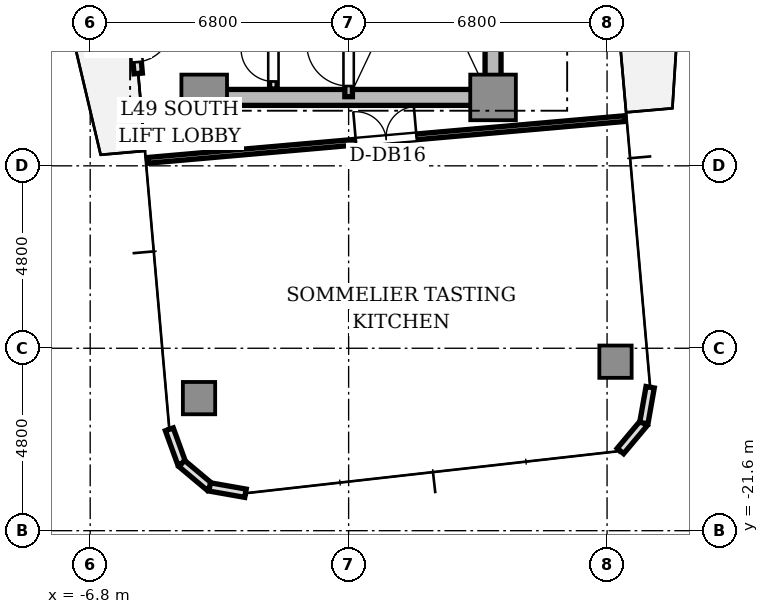
"""IFC4 building model, lengths in metres.
Left out: names, types, materials, properties, quantities, classifications, styles, units other than length and angle.
Written with IfcOpenShell. Run it as: python <this file> out.ifc"""

import sys

from ifc_helpers import new_model, si_unit, direction, frame, frame_2d, origin, origin_2d, place, context, subcontext, project, spatial, rectangle, extrude, source, transform, mapped, element, fill, save


model = new_model("IFC4")
c1 = context("Model", 3, precision=1e-05, world=origin(), true_north=direction((0.0, 1.0)))
c2 = subcontext(c1, "Body", "Model", "MODEL_VIEW")
j1 = project(units=[si_unit("LENGTHUNIT", "METRE"), si_unit("PLANEANGLEUNIT", "RADIAN")], contexts=[c1])
p1 = place(None, origin())
s1 = spatial("IfcSite", under=j1, at=p1, CompositionType="ELEMENT")
p2 = place(p1, origin())
s2 = spatial("IfcBuilding", under=s1, at=p2, CompositionType="ELEMENT")
p3 = place(p2, frame((0.0, 0.0, 178.55)))
s3 = spatial("IfcBuildingStorey", under=s2, at=p3, CompositionType="ELEMENT", Elevation=178.55)
p4 = place(p3, frame((-3.55, -10.2, 0.0), z_axis=(0.0, 0.0, 1.0), x_axis=(1.0, 0.0, 0.0)))
e1 = element("IfcWall", 1, at=p4, inside=s3, PredefinedType="SHEAR", context=c2, shape_type="SweptSolid", body=[
    extrude(rectangle(XDim=7.1, YDim=0.42, at=frame_2d((3.55, 0.0))), origin(), (0.0, 0.0, 1.0), 3.11),
])
p5 = place(p3, frame((3.8, -9.75, 0.0), z_axis=(0.0, 0.0, 1.0), x_axis=(0.0, 1.0, 0.0)))
e2 = element("IfcWall", 2, at=p5, inside=s3, PredefinedType="SHEAR", context=c2, shape_type="SweptSolid", body=[
    extrude(rectangle(XDim=6.9, YDim=0.42, at=frame_2d((3.45, 0.0))), origin(), (0.0, 0.0, 1.0), 3.11),
])
m1 = source(origin(), c2, "Body", "SweptSolid", [
    extrude(rectangle(XDim=1.2, YDim=1.2, at=origin_2d()), origin(), (0.0, 0.0, 1.0), 3.11),
])
for number, where, z_axis, x_axis in (
    (3, (-3.8, -10.2, 0.0), (0.0, 0.0, 1.0), (1.0, 0.0, 0.0)),
    (4, (3.8, -10.2, 0.0), (0.0, 0.0, 1.0), (1.0, 0.0, 0.0)),
):
    element("IfcColumn", number, at=place(p3, frame(where, z_axis=z_axis, x_axis=x_axis)), inside=s3, PredefinedType="COLUMN", context=c2, shape_type="MappedRepresentation", body=[
        mapped(m1, transform((0.0, 0.0, 0.0), scale=1.0)),
    ])
m2 = source(origin(), c2, "Body", "SweptSolid", [
    extrude(rectangle(XDim=0.85, YDim=0.85, at=origin_2d()), origin(), (0.0, 0.0, 1.0), 3.11),
])
for number, where, z_axis, x_axis in (
    (5, (-3.936, -18.112, 0.0), (0.0, 0.0, 1.0), (1.0, 0.0, 0.0)),
    (6, (7.022, -17.153, 0.0), (0.0, 0.0, 1.0), (1.0, 0.0, 0.0)),
):
    element("IfcColumn", number, at=place(p3, frame(where, z_axis=z_axis, x_axis=x_axis)), inside=s3, PredefinedType="COLUMN", context=c2, shape_type="MappedRepresentation", body=[
        mapped(m2, transform((0.0, 0.0, 0.0), scale=1.0)),
    ])
p6 = place(p3, frame((-5.772, -6.879, 0.0), z_axis=(0.0, 0.0, 1.0), x_axis=(0.087168071984, -0.996193619346, 0.0)))
e7 = element("IfcWall", 7, at=p6, inside=s3, PredefinedType="STANDARD", context=c2, shape_type="SweptSolid", body=[
    extrude(rectangle(XDim=2.7, YDim=0.22, at=frame_2d((1.35, 0.0))), origin(), (0.0, 0.0, 1.0), 3.11),
])
p7 = place(p6, frame((1.4, 0.0, 0.0)))
e8 = element("IfcOpeningElement", 8, at=p7, cuts=e7, PredefinedType="OPENING", context=c2, shape_type="SweptSolid", body=[
    extrude(rectangle(XDim=1.0, YDim=2.2, at=frame_2d((0.5, 1.1))), frame((0.0, 0.12, 0.0), z_axis=(0.0, -1.0, 0.0), x_axis=(1.0, 0.0, 0.0)), (0.0, 0.0, 1.0), 0.24),
])
p8 = place(p3, frame((-4.718, -18.933, 0.0), z_axis=(0.0, 0.0, 1.0), x_axis=(0.34188635151, -0.939741306239, 0.0)))
e9 = element("IfcWall", 9, at=p8, inside=s3, PredefinedType="STANDARD", context=c2, shape_type="SweptSolid", body=[
    extrude(rectangle(XDim=0.958, YDim=0.22, at=frame_2d((0.479, 0.0))), origin(), (0.0, 0.0, 1.0), 3.11),
])
for number, where, z_axis, x_axis in (
    (10, (-4.39, -19.833, 0.0), (0.0, 0.0, 1.0), (0.766, -0.643, 0.0)),
    (11, (-3.657, -20.449, 0.0), (0.0, 0.0, 1.0), (0.985, -0.174, 0.0)),
):
    element("IfcWall", number, at=place(p3, frame(where, z_axis=z_axis, x_axis=x_axis)), inside=s3, PredefinedType="STANDARD", context=c2, shape_type="SweptSolid", body=[
        extrude(rectangle(XDim=0.958, YDim=0.22, at=frame_2d((0.479, 0.0))), origin(), (0.0, 0.0, 1.0), 3.11),
    ])
for number, where, z_axis, x_axis in (
    (12, (7.152, -19.503, 0.0), (0.0, 0.0, 1.0), (0.643, 0.766, 0.0)),
    (13, (7.768, -18.769, 0.0), (0.0, 0.0, 1.0), (0.174, 0.985, 0.0)),
):
    element("IfcWall", number, at=place(p3, frame(where, z_axis=z_axis, x_axis=x_axis)), inside=s3, PredefinedType="STANDARD", context=c2, shape_type="SweptSolid", body=[
        extrude(rectangle(XDim=0.958, YDim=0.22, at=frame_2d((0.479, 0.0))), origin(), (0.0, 0.0, 1.0), 3.11),
    ])
p9 = place(p3, frame((0.0, -10.18, 0.0), z_axis=(0.0, 0.0, 1.0), x_axis=(0.0, 1.0, 0.0)))
e14 = element("IfcWall", 14, at=p9, inside=s3, PredefinedType="SOLIDWALL", context=c2, shape_type="SweptSolid", body=[
    extrude(rectangle(XDim=7.68, YDim=0.2, at=frame_2d((3.84, 0.0))), origin(), (0.0, 0.0, 1.0), 3.11),
])
p10 = place(p9, frame((0.28, 0.0, 0.0)))
e15 = element("IfcOpeningElement", 15, at=p10, cuts=e14, PredefinedType="OPENING", context=c2, shape_type="SweptSolid", body=[
    extrude(rectangle(XDim=1.1, YDim=2.15, at=frame_2d((0.55, 1.075))), frame((0.0, 0.11, 0.0), z_axis=(0.0, -1.0, 0.0), x_axis=(1.0, 0.0, 0.0)), (0.0, 0.0, 1.0), 0.22),
])
p11 = place(p3, frame((-1.98, -9.98, 0.0), z_axis=(0.0, 0.0, 1.0), x_axis=(0.0, 1.0, 0.0)))
e16 = element("IfcWall", 16, at=p11, inside=s3, PredefinedType="SOLIDWALL", context=c2, shape_type="SweptSolid", body=[
    extrude(rectangle(XDim=4.66, YDim=0.2, at=frame_2d((2.33, 0.0))), origin(), (0.0, 0.0, 1.0), 2.66),
])
p12 = place(p11, frame((0.2, 0.0, 0.0)))
e17 = element("IfcOpeningElement", 17, at=p12, cuts=e16, PredefinedType="OPENING", context=c2, shape_type="SweptSolid", body=[
    extrude(rectangle(XDim=0.85, YDim=2.1, at=frame_2d((0.425, 1.05))), frame((0.0, 0.11, 0.0), z_axis=(0.0, -1.0, 0.0), x_axis=(1.0, 0.0, 0.0)), (0.0, 0.0, 1.0), 0.22),
])
p13 = place(p3, frame((-5.287, -11.856, 0.0), z_axis=(0.0, 0.0, 1.0), x_axis=(0.996194790044, 0.087154691724, 0.0)))
e18 = element("IfcWall", 18, at=p13, inside=s3, PredefinedType="PARTITIONING", context=c2, shape_type="SweptSolid", body=[
    extrude(rectangle(XDim=12.6, YDim=0.15, at=frame_2d((6.3, 0.0))), origin(), (0.0, 0.0, 1.0), 2.66),
])
p14 = place(p13, frame((5.5, 0.0, 0.0)))
e19 = element("IfcOpeningElement", 19, at=p14, cuts=e18, PredefinedType="OPENING", context=c2, shape_type="SweptSolid", body=[
    extrude(rectangle(XDim=1.6, YDim=2.25, at=frame_2d((0.8, 1.125))), frame((0.0, 0.085, 0.0), z_axis=(0.0, -1.0, 0.0), x_axis=(1.0, 0.0, 0.0)), (0.0, 0.0, 1.0), 0.17),
])
m3 = source(origin(), c2, "Body", "SweptSolid", [
    extrude(rectangle(XDim=1.0, YDim=0.05, at=origin_2d()), origin(), (0.0, 0.0, 1.0), 2.2),
])
p15 = place(p7, frame((0.5, 0.0, 0.0)))
e20 = element("IfcDoor", 20, at=p15, inside=s3, OperationType="SINGLE_SWING_LEFT", PredefinedType="DOOR", context=c2, shape_type="MappedRepresentation", body=[
    mapped(m3, transform((0.0, 0.0, 0.0), scale=1.0)),
])
fill(e8, e20)
m4 = source(origin(), c2, "Body", "SweptSolid", [
    extrude(rectangle(XDim=1.1, YDim=0.05, at=origin_2d()), origin(), (0.0, 0.0, 1.0), 2.15),
])
p16 = place(p10, frame((0.55, 0.0, 0.0)))
e21 = element("IfcDoor", 21, at=p16, inside=s3, OperationType="SINGLE_SWING_RIGHT", PredefinedType="DOOR", context=c2, shape_type="MappedRepresentation", body=[
    mapped(m4, transform((0.0, 0.0, 0.0), scale=1.0)),
])
fill(e15, e21)
m5 = source(origin(), c2, "Body", "SweptSolid", [
    extrude(rectangle(XDim=0.85, YDim=0.05, at=origin_2d()), origin(), (0.0, 0.0, 1.0), 2.1),
])
p17 = place(p12, frame((0.425, 0.0, 0.0)))
e22 = element("IfcDoor", 22, at=p17, inside=s3, OperationType="SINGLE_SWING_RIGHT", PredefinedType="DOOR", context=c2, shape_type="MappedRepresentation", body=[
    mapped(m5, transform((0.0, 0.0, 0.0), scale=1.0)),
])
fill(e17, e22)
m6 = source(origin(), c2, "Body", "SweptSolid", [
    extrude(rectangle(XDim=1.6, YDim=0.05, at=origin_2d()), origin(), (0.0, 0.0, 1.0), 2.25),
])
p18 = place(p14, frame((0.8, 0.0, 0.0)))
e23 = element("IfcDoor", 23, at=p18, inside=s3, OperationType="DOUBLE_DOOR_SINGLE_SWING", PredefinedType="DOOR", context=c2, shape_type="MappedRepresentation", body=[
    mapped(m6, transform((0.0, 0.0, 0.0), scale=1.0)),
])
fill(e19, e23)
save(model, sys.argv[1])
